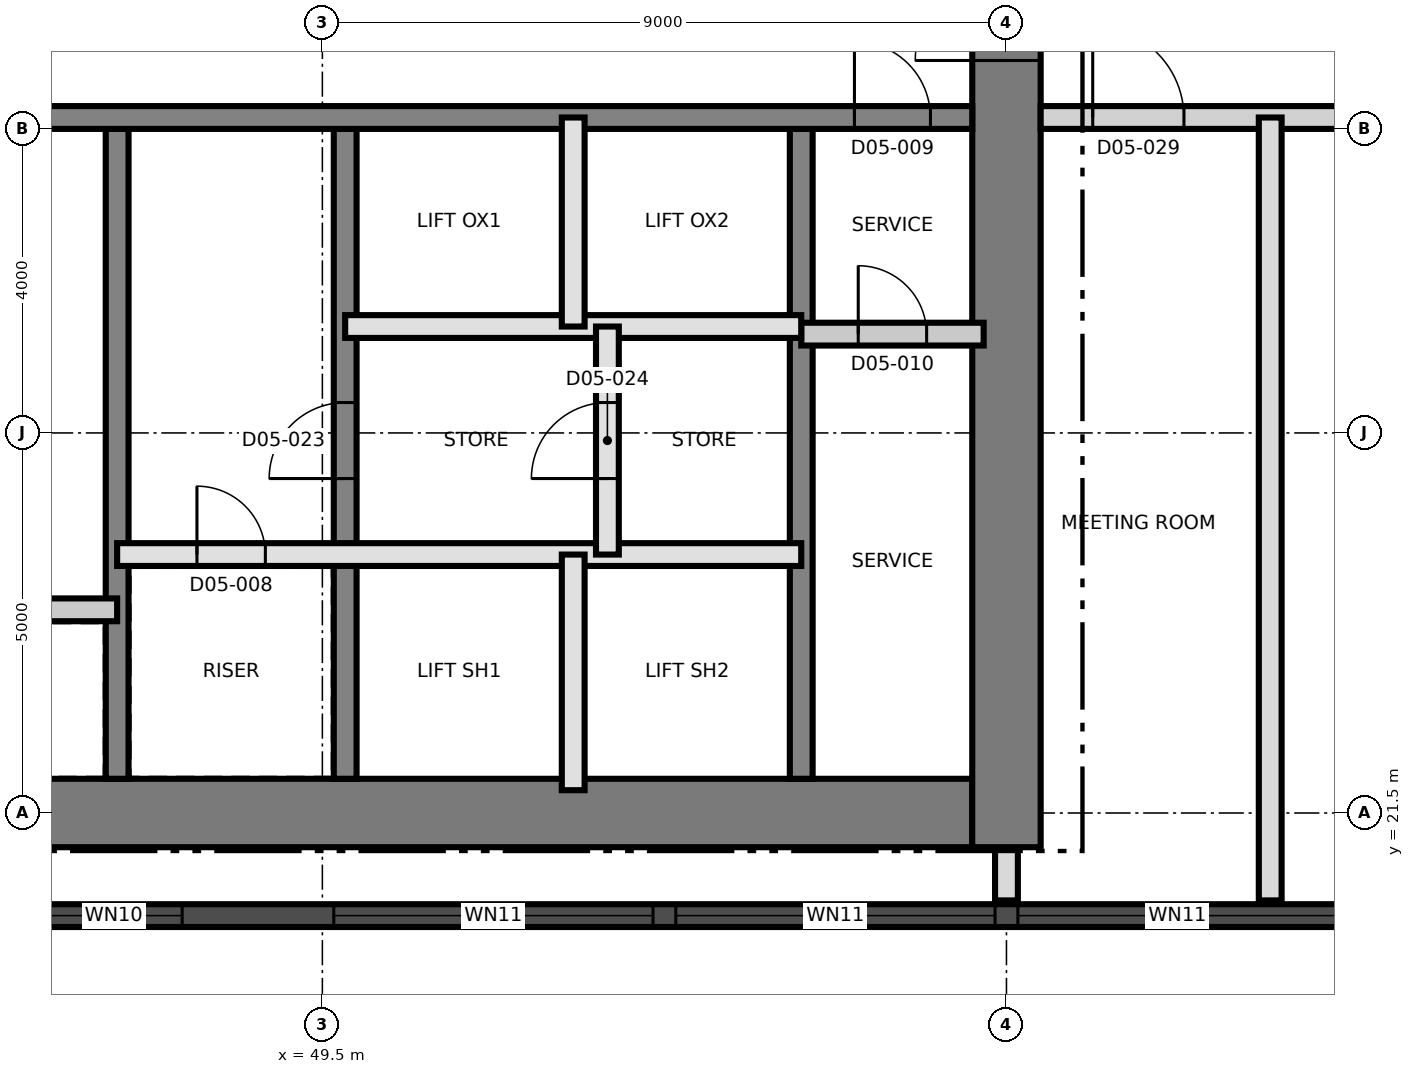
"""IFC4 building model, lengths in metres.
Left out: names, types, materials, properties, quantities, classifications, styles, units other than length and angle.
Written with IfcOpenShell. Run it as: python <this file> out.ifc"""

import sys

from ifc_helpers import new_model, si_unit, direction, frame, frame_2d, origin, place, context, subcontext, project, spatial, rectangle, extrude, element, fill, save


model = new_model("IFC4")
c1 = context("Model", 3, precision=1e-05, world=origin(), true_north=direction((0.0, 1.0)))
c2 = subcontext(c1, "Body", "Model", "MODEL_VIEW")
j1 = project(units=[si_unit("LENGTHUNIT", "METRE"), si_unit("PLANEANGLEUNIT", "RADIAN")], contexts=[c1])
p1 = place(None, origin())
s1 = spatial("IfcSite", under=j1, at=p1, CompositionType="ELEMENT")
p2 = place(p1, origin())
s2 = spatial("IfcBuilding", under=s1, at=p2, CompositionType="ELEMENT")
p3 = place(p2, frame((0.0, 0.0, 74.2)))
s3 = spatial("IfcBuildingStorey", under=s2, at=p3, CompositionType="ELEMENT", Elevation=74.2)
p4 = place(p3, frame((31.05, 21.5, 0.0), z_axis=(0.0, 0.0, 1.0), x_axis=(1.0, 0.0, 0.0)))
e1 = element("IfcWall", 1, at=p4, inside=s3, PredefinedType="SHEAR", context=c2, shape_type="SweptSolid", body=[
    extrude(rectangle(XDim=27.0, YDim=0.9, at=frame_2d((13.5, 0.0))), origin(), (0.0, 0.0, 1.0), 3.7),
])
p5 = place(p3, frame((58.5, 21.05, 0.0), z_axis=(0.0, 0.0, 1.0), x_axis=(0.0, 1.0, 0.0)))
e2 = element("IfcWall", 2, at=p5, inside=s3, PredefinedType="SHEAR", context=c2, shape_type="SweptSolid", body=[
    extrude(rectangle(XDim=18.9, YDim=0.9, at=frame_2d((9.45, 0.0))), origin(), (0.0, 0.0, 1.0), 3.7),
])
p6 = place(p5, frame((10.35, 0.0, 0.0)))
e3 = element("IfcOpeningElement", 3, at=p6, cuts=e2, PredefinedType="OPENING", context=c2, shape_type="SweptSolid", body=[
    extrude(rectangle(XDim=1.2, YDim=2.1, at=frame_2d((0.6, 1.05))), frame((0.0, 0.46, 0.0), z_axis=(0.0, -1.0, 0.0), x_axis=(1.0, 0.0, 0.0)), (0.0, 0.0, 1.0), 0.92),
])
p7 = place(p3, frame((46.8, 21.95, 0.0), z_axis=(0.0, 0.0, 1.0), x_axis=(0.0, 1.0, 0.0)))
e4 = element("IfcWall", 4, at=p7, inside=s3, PredefinedType="SHEAR", context=c2, shape_type="SweptSolid", body=[
    extrude(rectangle(XDim=8.55, YDim=0.3, at=frame_2d((4.275, 0.0))), origin(), (0.0, 0.0, 1.0), 3.7),
])
p8 = place(p3, frame((49.8, 21.95, 0.0), z_axis=(0.0, 0.0, 1.0), x_axis=(0.0, 1.0, 0.0)))
e5 = element("IfcWall", 5, at=p8, inside=s3, PredefinedType="SHEAR", context=c2, shape_type="SweptSolid", body=[
    extrude(rectangle(XDim=8.55, YDim=0.3, at=frame_2d((4.275, 0.0))), origin(), (0.0, 0.0, 1.0), 3.7),
])
p9 = place(p8, frame((3.95, 0.0, 0.0)))
e6 = element("IfcOpeningElement", 6, at=p9, cuts=e5, PredefinedType="OPENING", context=c2, shape_type="SweptSolid", body=[
    extrude(rectangle(XDim=1.0, YDim=2.1, at=frame_2d((0.5, 1.05))), frame((0.0, 0.16, 0.0), z_axis=(0.0, -1.0, 0.0), x_axis=(1.0, 0.0, 0.0)), (0.0, 0.0, 1.0), 0.32),
])
p10 = place(p3, frame((55.8, 21.95, 0.0), z_axis=(0.0, 0.0, 1.0), x_axis=(0.0, 1.0, 0.0)))
e7 = element("IfcWall", 7, at=p10, inside=s3, PredefinedType="SHEAR", context=c2, shape_type="SweptSolid", body=[
    extrude(rectangle(XDim=8.55, YDim=0.3, at=frame_2d((4.275, 0.0))), origin(), (0.0, 0.0, 1.0), 3.7),
])
p11 = place(p3, frame((31.95, 30.65, 0.0), z_axis=(0.0, 0.0, 1.0), x_axis=(1.0, 0.0, 0.0)))
e8 = element("IfcWall", 8, at=p11, inside=s3, PredefinedType="SHEAR", context=c2, shape_type="SweptSolid", body=[
    extrude(rectangle(XDim=26.1, YDim=0.3, at=frame_2d((13.05, 0.0))), origin(), (0.0, 0.0, 1.0), 3.7),
])
p12 = place(p11, frame((24.55, 0.0, 0.0)))
e9 = element("IfcOpeningElement", 9, at=p12, cuts=e8, PredefinedType="OPENING", context=c2, shape_type="SweptSolid", body=[
    extrude(rectangle(XDim=1.0, YDim=2.1, at=frame_2d((0.5, 1.05))), frame((0.0, 0.16, 0.0), z_axis=(0.0, -1.0, 0.0), x_axis=(1.0, 0.0, 0.0)), (0.0, 0.0, 1.0), 0.32),
])
p13 = place(p11, frame((11.35, 0.0, 0.0)))
e10 = element("IfcOpeningElement", 10, at=p13, cuts=e8, PredefinedType="OPENING", context=c2, shape_type="SweptSolid", body=[
    extrude(rectangle(XDim=1.0, YDim=2.1, at=frame_2d((0.5, 1.05))), frame((0.0, 0.16, 0.0), z_axis=(0.0, -1.0, 0.0), x_axis=(1.0, 0.0, 0.0)), (0.0, 0.0, 1.0), 0.32),
])
p14 = place(p3, frame((44.011, 20.15, 0.0), z_axis=(0.0, 0.0, 1.0), x_axis=(1.0, 0.0, 0.0)))
e11 = element("IfcWall", 11, at=p14, inside=s3, PredefinedType="SOLIDWALL", context=c2, shape_type="SweptSolid", body=[
    extrude(rectangle(XDim=43.476, YDim=0.3, at=frame_2d((21.738, 0.0))), origin(), (0.0, 0.0, 1.0), 3.4),
])
p15 = place(p14, frame((1.845, 0.0, 0.3)))
e12 = element("IfcOpeningElement", 12, at=p15, cuts=e11, PredefinedType="OPENING", context=c2, shape_type="SweptSolid", body=[
    extrude(rectangle(XDim=1.8, YDim=2.4, at=frame_2d((0.9, 1.2))), frame((0.0, 0.16, 0.0), z_axis=(0.0, -1.0, 0.0), x_axis=(1.0, 0.0, 0.0)), (0.0, 0.0, 1.0), 0.32),
])
p16 = place(p14, frame((5.639, 0.0, 0.9)))
e13 = element("IfcOpeningElement", 13, at=p16, cuts=e11, PredefinedType="OPENING", context=c2, shape_type="SweptSolid", body=[
    extrude(rectangle(XDim=4.2, YDim=1.5, at=frame_2d((2.1, 0.75))), frame((0.0, 0.16, 0.0), z_axis=(0.0, -1.0, 0.0), x_axis=(1.0, 0.0, 0.0)), (0.0, 0.0, 1.0), 0.32),
])
p17 = place(p14, frame((10.139, 0.0, 0.9)))
e14 = element("IfcOpeningElement", 14, at=p17, cuts=e11, PredefinedType="OPENING", context=c2, shape_type="SweptSolid", body=[
    extrude(rectangle(XDim=4.2, YDim=1.5, at=frame_2d((2.1, 0.75))), frame((0.0, 0.16, 0.0), z_axis=(0.0, -1.0, 0.0), x_axis=(1.0, 0.0, 0.0)), (0.0, 0.0, 1.0), 0.32),
])
p18 = place(p14, frame((14.639, 0.0, 0.9)))
e15 = element("IfcOpeningElement", 15, at=p18, cuts=e11, PredefinedType="OPENING", context=c2, shape_type="SweptSolid", body=[
    extrude(rectangle(XDim=4.2, YDim=1.5, at=frame_2d((2.1, 0.75))), frame((0.0, 0.16, 0.0), z_axis=(0.0, -1.0, 0.0), x_axis=(1.0, 0.0, 0.0)), (0.0, 0.0, 1.0), 0.32),
])
p19 = place(p14, frame((19.139, 0.0, 0.9)))
e16 = element("IfcOpeningElement", 16, at=p19, cuts=e11, PredefinedType="OPENING", context=c2, shape_type="SweptSolid", body=[
    extrude(rectangle(XDim=4.2, YDim=1.5, at=frame_2d((2.1, 0.75))), frame((0.0, 0.16, 0.0), z_axis=(0.0, -1.0, 0.0), x_axis=(1.0, 0.0, 0.0)), (0.0, 0.0, 1.0), 0.32),
])
p20 = place(p14, frame((23.639, 0.0, 0.9)))
e17 = element("IfcOpeningElement", 17, at=p20, cuts=e11, PredefinedType="OPENING", context=c2, shape_type="SweptSolid", body=[
    extrude(rectangle(XDim=4.2, YDim=1.5, at=frame_2d((2.1, 0.75))), frame((0.0, 0.16, 0.0), z_axis=(0.0, -1.0, 0.0), x_axis=(1.0, 0.0, 0.0)), (0.0, 0.0, 1.0), 0.32),
])
p21 = place(p14, frame((28.139, 0.0, 0.9)))
e18 = element("IfcOpeningElement", 18, at=p21, cuts=e11, PredefinedType="OPENING", context=c2, shape_type="SweptSolid", body=[
    extrude(rectangle(XDim=4.2, YDim=1.5, at=frame_2d((2.1, 0.75))), frame((0.0, 0.16, 0.0), z_axis=(0.0, -1.0, 0.0), x_axis=(1.0, 0.0, 0.0)), (0.0, 0.0, 1.0), 0.32),
])
p22 = place(p14, frame((32.639, 0.0, 0.9)))
e19 = element("IfcOpeningElement", 19, at=p22, cuts=e11, PredefinedType="OPENING", context=c2, shape_type="SweptSolid", body=[
    extrude(rectangle(XDim=4.2, YDim=1.5, at=frame_2d((2.1, 0.75))), frame((0.0, 0.16, 0.0), z_axis=(0.0, -1.0, 0.0), x_axis=(1.0, 0.0, 0.0)), (0.0, 0.0, 1.0), 0.32),
])
p23 = place(p14, frame((37.139, 0.0, 0.9)))
e20 = element("IfcOpeningElement", 20, at=p23, cuts=e11, PredefinedType="OPENING", context=c2, shape_type="SweptSolid", body=[
    extrude(rectangle(XDim=4.2, YDim=1.5, at=frame_2d((2.1, 0.75))), frame((0.0, 0.16, 0.0), z_axis=(0.0, -1.0, 0.0), x_axis=(1.0, 0.0, 0.0)), (0.0, 0.0, 1.0), 0.32),
])
p24 = place(p3, frame((40.8, 24.173, 0.0), z_axis=(0.0, 0.0, 1.0), x_axis=(1.0, 0.0, 0.0)))
e21 = element("IfcWall", 21, at=p24, inside=s3, PredefinedType="PARTITIONING", context=c2, shape_type="SweptSolid", body=[
    extrude(rectangle(XDim=6.0, YDim=0.3, at=frame_2d((3.0, 0.0))), origin(), (0.0, 0.0, 1.0), 3.4),
])
p25 = place(p24, frame((2.5, 0.0, 0.0)))
e22 = element("IfcOpeningElement", 22, at=p25, cuts=e21, PredefinedType="OPENING", context=c2, shape_type="SweptSolid", body=[
    extrude(rectangle(XDim=1.0, YDim=2.1, at=frame_2d((0.5, 1.05))), frame((0.0, 0.16, 0.0), z_axis=(0.0, -1.0, 0.0), x_axis=(1.0, 0.0, 0.0)), (0.0, 0.0, 1.0), 0.32),
])
p26 = place(p3, frame((46.8, 24.9, 0.0), z_axis=(0.0, 0.0, 1.0), x_axis=(1.0, 0.0, 0.0)))
e23 = element("IfcWall", 23, at=p26, inside=s3, PredefinedType="SOLIDWALL", context=c2, shape_type="SweptSolid", body=[
    extrude(rectangle(XDim=9.0, YDim=0.3, at=frame_2d((4.5, 0.0))), origin(), (0.0, 0.0, 1.0), 3.4),
])
p27 = place(p26, frame((1.05, 0.0, 0.0)))
e24 = element("IfcOpeningElement", 24, at=p27, cuts=e23, PredefinedType="OPENING", context=c2, shape_type="SweptSolid", body=[
    extrude(rectangle(XDim=0.9, YDim=2.1, at=frame_2d((0.45, 1.05))), frame((0.0, 0.16, 0.0), z_axis=(0.0, -1.0, 0.0), x_axis=(1.0, 0.0, 0.0)), (0.0, 0.0, 1.0), 0.32),
])
p28 = place(p3, frame((55.8, 27.8, 0.0), z_axis=(0.0, 0.0, 1.0), x_axis=(1.0, 0.0, 0.0)))
e25 = element("IfcWall", 25, at=p28, inside=s3, PredefinedType="PARTITIONING", context=c2, shape_type="SweptSolid", body=[
    extrude(rectangle(XDim=2.4, YDim=0.3, at=frame_2d((1.2, 0.0))), origin(), (0.0, 0.0, 1.0), 3.4),
])
p29 = place(p28, frame((0.75, 0.0, 0.0)))
e26 = element("IfcOpeningElement", 26, at=p29, cuts=e25, PredefinedType="OPENING", context=c2, shape_type="SweptSolid", body=[
    extrude(rectangle(XDim=0.9, YDim=2.1, at=frame_2d((0.45, 1.05))), frame((0.0, 0.16, 0.0), z_axis=(0.0, -1.0, 0.0), x_axis=(1.0, 0.0, 0.0)), (0.0, 0.0, 1.0), 0.32),
])
p30 = place(p3, frame((49.8, 27.9, 0.0), z_axis=(0.0, 0.0, 1.0), x_axis=(1.0, 0.0, 0.0)))
e27 = element("IfcWall", 27, at=p30, inside=s3, PredefinedType="SOLIDWALL", context=c2, shape_type="SweptSolid", body=[
    extrude(rectangle(XDim=6.0, YDim=0.3, at=frame_2d((3.0, 0.0))), origin(), (0.0, 0.0, 1.0), 3.4),
])
p31 = place(p3, frame((52.8, 21.8, 0.0), z_axis=(0.0, 0.0, 1.0), x_axis=(0.0, 1.0, 0.0)))
e28 = element("IfcWall", 28, at=p31, inside=s3, PredefinedType="SOLIDWALL", context=c2, shape_type="SweptSolid", body=[
    extrude(rectangle(XDim=3.1, YDim=0.3, at=frame_2d((1.55, 0.0))), origin(), (0.0, 0.0, 1.0), 3.4),
])
p32 = place(p3, frame((52.8, 27.9, 0.0), z_axis=(0.0, 0.0, 1.0), x_axis=(0.0, 1.0, 0.0)))
e29 = element("IfcWall", 29, at=p32, inside=s3, PredefinedType="SOLIDWALL", context=c2, shape_type="SweptSolid", body=[
    extrude(rectangle(XDim=2.75, YDim=0.3, at=frame_2d((1.375, 0.0))), origin(), (0.0, 0.0, 1.0), 3.4),
])
p33 = place(p3, frame((53.25, 24.9, 0.0), z_axis=(0.0, 0.0, 1.0), x_axis=(0.0, 1.0, 0.0)))
e30 = element("IfcWall", 30, at=p33, inside=s3, PredefinedType="SOLIDWALL", context=c2, shape_type="SweptSolid", body=[
    extrude(rectangle(XDim=3.0, YDim=0.3, at=frame_2d((1.5, 0.0))), origin(), (0.0, 0.0, 1.0), 3.4),
])
p34 = place(p33, frame((1.0, 0.0, 0.0)))
e31 = element("IfcOpeningElement", 31, at=p34, cuts=e30, PredefinedType="OPENING", context=c2, shape_type="SweptSolid", body=[
    extrude(rectangle(XDim=1.0, YDim=2.1, at=frame_2d((0.5, 1.05))), frame((0.0, 0.16, 0.0), z_axis=(0.0, -1.0, 0.0), x_axis=(1.0, 0.0, 0.0)), (0.0, 0.0, 1.0), 0.32),
])
p35 = place(p3, frame((58.95, 30.65, 0.0), z_axis=(0.0, 0.0, 1.0), x_axis=(1.0, 0.0, 0.0)))
e32 = element("IfcWall", 32, at=p35, inside=s3, PredefinedType="PARTITIONING", context=c2, shape_type="SweptSolid", body=[
    extrude(rectangle(XDim=26.38, YDim=0.3, at=frame_2d((13.19, 0.0))), origin(), (0.0, 0.0, 1.0), 3.4),
])
p36 = place(p35, frame((0.685, 0.0, 0.0)))
e33 = element("IfcOpeningElement", 33, at=p36, cuts=e32, PredefinedType="OPENING", context=c2, shape_type="SweptSolid", body=[
    extrude(rectangle(XDim=1.2, YDim=2.1, at=frame_2d((0.6, 1.05))), frame((0.0, 0.16, 0.0), z_axis=(0.0, -1.0, 0.0), x_axis=(1.0, 0.0, 0.0)), (0.0, 0.0, 1.0), 0.32),
])
p37 = place(p35, frame((3.935, 0.0, 0.0)))
e34 = element("IfcOpeningElement", 34, at=p37, cuts=e32, PredefinedType="OPENING", context=c2, shape_type="SweptSolid", body=[
    extrude(rectangle(XDim=1.0, YDim=2.1, at=frame_2d((0.5, 1.05))), frame((0.0, 0.16, 0.0), z_axis=(0.0, -1.0, 0.0), x_axis=(1.0, 0.0, 0.0)), (0.0, 0.0, 1.0), 0.32),
])
p38 = place(p35, frame((11.965, 0.0, 0.0)))
e35 = element("IfcOpeningElement", 35, at=p38, cuts=e32, PredefinedType="OPENING", context=c2, shape_type="SweptSolid", body=[
    extrude(rectangle(XDim=1.0, YDim=2.1, at=frame_2d((0.5, 1.05))), frame((0.0, 0.16, 0.0), z_axis=(0.0, -1.0, 0.0), x_axis=(1.0, 0.0, 0.0)), (0.0, 0.0, 1.0), 0.32),
])
p39 = place(p35, frame((14.915, 0.0, 0.0)))
e36 = element("IfcOpeningElement", 36, at=p39, cuts=e32, PredefinedType="OPENING", context=c2, shape_type="SweptSolid", body=[
    extrude(rectangle(XDim=1.4, YDim=2.1, at=frame_2d((0.7, 1.05))), frame((0.0, 0.16, 0.0), z_axis=(0.0, -1.0, 0.0), x_axis=(1.0, 0.0, 0.0)), (0.0, 0.0, 1.0), 0.32),
])
p40 = place(p35, frame((18.685, 0.0, 0.0)))
e37 = element("IfcOpeningElement", 37, at=p40, cuts=e32, PredefinedType="OPENING", context=c2, shape_type="SweptSolid", body=[
    extrude(rectangle(XDim=1.2, YDim=2.1, at=frame_2d((0.6, 1.05))), frame((0.0, 0.16, 0.0), z_axis=(0.0, -1.0, 0.0), x_axis=(1.0, 0.0, 0.0)), (0.0, 0.0, 1.0), 0.32),
])
p41 = place(p35, frame((21.935, 0.0, 0.0)))
e38 = element("IfcOpeningElement", 38, at=p41, cuts=e32, PredefinedType="OPENING", context=c2, shape_type="SweptSolid", body=[
    extrude(rectangle(XDim=1.0, YDim=2.1, at=frame_2d((0.5, 1.05))), frame((0.0, 0.16, 0.0), z_axis=(0.0, -1.0, 0.0), x_axis=(1.0, 0.0, 0.0)), (0.0, 0.0, 1.0), 0.32),
])
p42 = place(p3, frame((58.5, 20.35, 0.0), z_axis=(0.0, 0.0, 1.0), x_axis=(0.0, 1.0, 0.0)))
e39 = element("IfcWall", 39, at=p42, inside=s3, PredefinedType="PARTITIONING", context=c2, shape_type="SweptSolid", body=[
    extrude(rectangle(XDim=0.68, YDim=0.3, at=frame_2d((0.34, 0.0))), origin(), (0.0, 0.0, 1.0), 3.4),
])
p43 = place(p3, frame((61.97, 20.35, 0.0), z_axis=(0.0, 0.0, 1.0), x_axis=(0.0, 1.0, 0.0)))
e40 = element("IfcWall", 40, at=p43, inside=s3, PredefinedType="PARTITIONING", context=c2, shape_type="SweptSolid", body=[
    extrude(rectangle(XDim=10.3, YDim=0.3, at=frame_2d((5.15, 0.0))), origin(), (0.0, 0.0, 1.0), 3.4),
])
p44 = place(p15, origin())
e41 = element("IfcWindow", 41, at=p44, inside=s3, PartitioningType="SINGLE_PANEL", PredefinedType="WINDOW", context=c2, shape_type="SweptSolid", body=[
    extrude(rectangle(XDim=1.8, YDim=2.4, at=frame_2d((0.9, 1.2))), frame((0.0, 0.03, 0.0), z_axis=(0.0, -1.0, 0.0), x_axis=(1.0, 0.0, 0.0)), (0.0, 0.0, 1.0), 0.06),
])
fill(e12, e41)
p45 = place(p16, origin())
e42 = element("IfcWindow", 42, at=p45, inside=s3, PartitioningType="SINGLE_PANEL", PredefinedType="WINDOW", context=c2, shape_type="SweptSolid", body=[
    extrude(rectangle(XDim=4.2, YDim=1.5, at=frame_2d((2.1, 0.75))), frame((0.0, 0.03, 0.0), z_axis=(0.0, -1.0, 0.0), x_axis=(1.0, 0.0, 0.0)), (0.0, 0.0, 1.0), 0.06),
])
fill(e13, e42)
p46 = place(p17, origin())
e43 = element("IfcWindow", 43, at=p46, inside=s3, PartitioningType="SINGLE_PANEL", PredefinedType="WINDOW", context=c2, shape_type="SweptSolid", body=[
    extrude(rectangle(XDim=4.2, YDim=1.5, at=frame_2d((2.1, 0.75))), frame((0.0, 0.03, 0.0), z_axis=(0.0, -1.0, 0.0), x_axis=(1.0, 0.0, 0.0)), (0.0, 0.0, 1.0), 0.06),
])
fill(e14, e43)
p47 = place(p18, origin())
e44 = element("IfcWindow", 44, at=p47, inside=s3, PartitioningType="SINGLE_PANEL", PredefinedType="WINDOW", context=c2, shape_type="SweptSolid", body=[
    extrude(rectangle(XDim=4.2, YDim=1.5, at=frame_2d((2.1, 0.75))), frame((0.0, 0.03, 0.0), z_axis=(0.0, -1.0, 0.0), x_axis=(1.0, 0.0, 0.0)), (0.0, 0.0, 1.0), 0.06),
])
fill(e15, e44)
p48 = place(p27, origin())
e45 = element("IfcDoor", 45, at=p48, inside=s3, OperationType="SINGLE_SWING_RIGHT", PredefinedType="DOOR", context=c2, shape_type="SweptSolid", body=[
    extrude(rectangle(XDim=0.9, YDim=2.1, at=frame_2d((0.45, 1.05))), frame((0.0, 0.025, 0.0), z_axis=(0.0, -1.0, 0.0), x_axis=(1.0, 0.0, 0.0)), (0.0, 0.0, 1.0), 0.05),
])
fill(e24, e45)
p49 = place(p12, origin())
e46 = element("IfcDoor", 46, at=p49, inside=s3, OperationType="SINGLE_SWING_LEFT", PredefinedType="DOOR", context=c2, shape_type="SweptSolid", body=[
    extrude(rectangle(XDim=1.0, YDim=2.1, at=frame_2d((0.5, 1.05))), frame((0.0, 0.025, 0.0), z_axis=(0.0, -1.0, 0.0), x_axis=(1.0, 0.0, 0.0)), (0.0, 0.0, 1.0), 0.05),
])
fill(e9, e46)
p50 = place(p29, origin())
e47 = element("IfcDoor", 47, at=p50, inside=s3, OperationType="SINGLE_SWING_RIGHT", PredefinedType="DOOR", context=c2, shape_type="SweptSolid", body=[
    extrude(rectangle(XDim=0.9, YDim=2.1, at=frame_2d((0.45, 1.05))), frame((0.0, 0.025, 0.0), z_axis=(0.0, -1.0, 0.0), x_axis=(1.0, 0.0, 0.0)), (0.0, 0.0, 1.0), 0.05),
])
fill(e26, e47)
p51 = place(p6, origin())
e48 = element("IfcDoor", 48, at=p51, inside=s3, OperationType="SINGLE_SWING_LEFT", PredefinedType="DOOR", context=c2, shape_type="SweptSolid", body=[
    extrude(rectangle(XDim=1.2, YDim=2.1, at=frame_2d((0.6, 1.05))), frame((0.0, 0.025, 0.0), z_axis=(0.0, -1.0, 0.0), x_axis=(1.0, 0.0, 0.0)), (0.0, 0.0, 1.0), 0.05),
])
fill(e3, e48)
p52 = place(p9, origin())
e49 = element("IfcDoor", 49, at=p52, inside=s3, OperationType="SINGLE_SWING_LEFT", PredefinedType="DOOR", context=c2, shape_type="SweptSolid", body=[
    extrude(rectangle(XDim=1.0, YDim=2.1, at=frame_2d((0.5, 1.05))), frame((0.0, 0.025, 0.0), z_axis=(0.0, -1.0, 0.0), x_axis=(1.0, 0.0, 0.0)), (0.0, 0.0, 1.0), 0.05),
])
fill(e6, e49)
p53 = place(p34, origin())
e50 = element("IfcDoor", 50, at=p53, inside=s3, OperationType="SINGLE_SWING_RIGHT", PredefinedType="DOOR", context=c2, shape_type="SweptSolid", body=[
    extrude(rectangle(XDim=1.0, YDim=2.1, at=frame_2d((0.5, 1.05))), frame((0.0, 0.025, 0.0), z_axis=(0.0, -1.0, 0.0), x_axis=(1.0, 0.0, 0.0)), (0.0, 0.0, 1.0), 0.05),
])
fill(e31, e50)
p54 = place(p36, origin())
e51 = element("IfcDoor", 51, at=p54, inside=s3, OperationType="SINGLE_SWING_LEFT", PredefinedType="DOOR", context=c2, shape_type="SweptSolid", body=[
    extrude(rectangle(XDim=1.2, YDim=2.1, at=frame_2d((0.6, 1.05))), frame((0.0, 0.025, 0.0), z_axis=(0.0, -1.0, 0.0), x_axis=(1.0, 0.0, 0.0)), (0.0, 0.0, 1.0), 0.05),
])
fill(e33, e51)
save(model, sys.argv[1])
